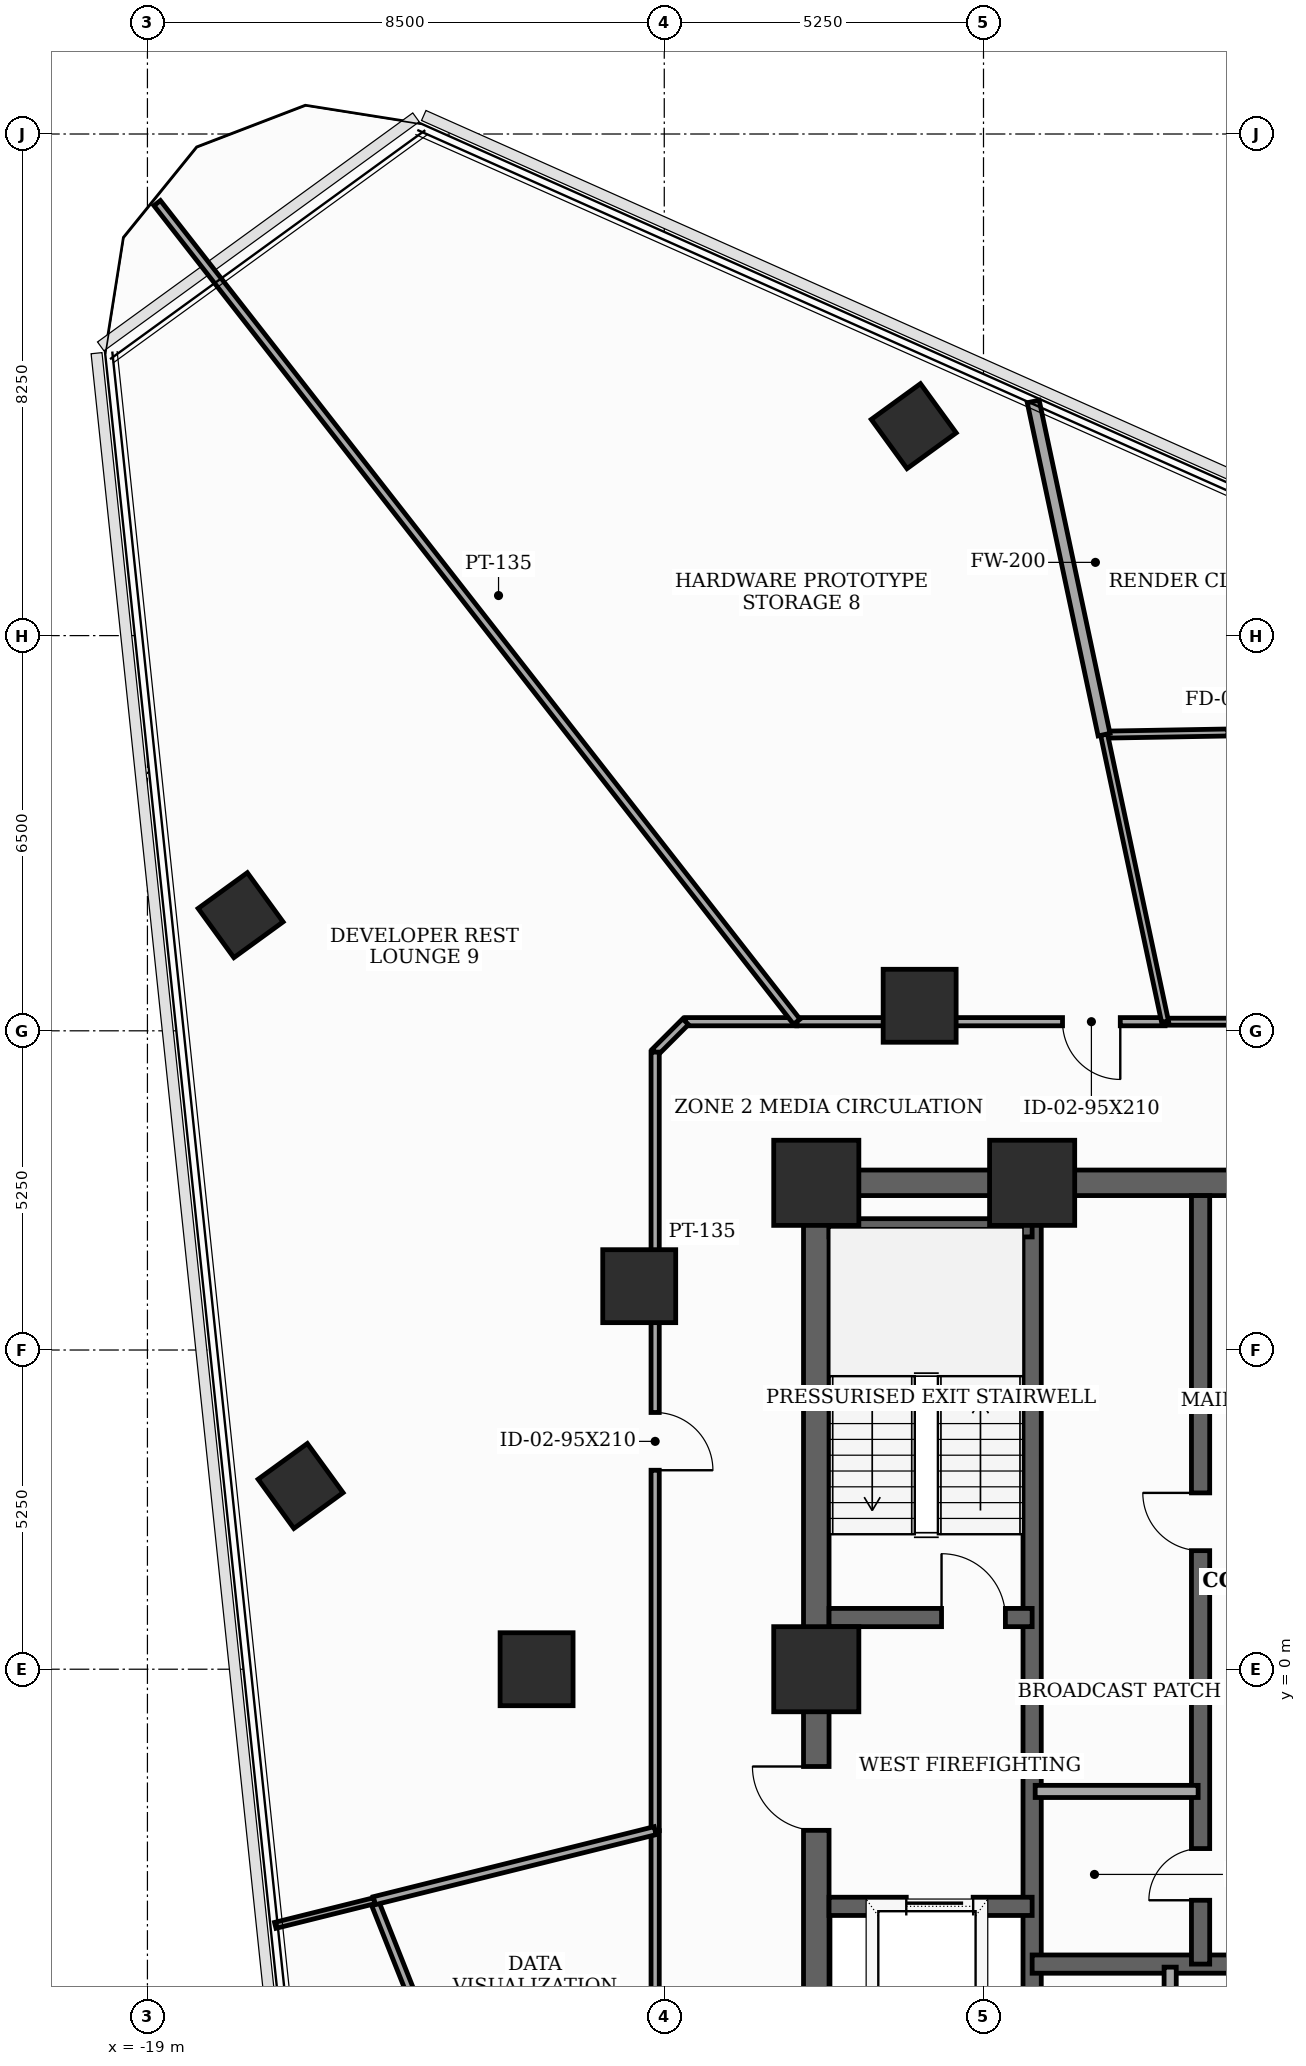
"""IFC4 building model, lengths in metres.
Left out: names, types, materials, properties, quantities, classifications, styles, units other than length and angle.
Written with IfcOpenShell. Run it as: python <this file> out.ifc"""

import sys

from ifc_helpers import new_model, si_unit, direction, frame, frame_2d, origin, origin_2d, place, context, subcontext, project, spatial, rectangle, extrude, element, fill, save


model = new_model("IFC4")
c1 = context("Model", 3, precision=1e-05, world=origin(), true_north=direction((0.0, 1.0)))
c2 = subcontext(c1, "Body", "Model", "MODEL_VIEW")
j1 = project(units=[si_unit("LENGTHUNIT", "METRE"), si_unit("PLANEANGLEUNIT", "RADIAN")], contexts=[c1])
p1 = place(None, origin())
s1 = spatial("IfcSite", under=j1, at=p1, CompositionType="ELEMENT")
p2 = place(p1, origin())
s2 = spatial("IfcBuilding", under=s1, at=p2, CompositionType="ELEMENT")
p3 = place(p2, frame((0.0, 0.0, 176.8)))
s3 = spatial("IfcBuildingStorey", under=s2, at=p3, CompositionType="ELEMENT", Elevation=176.8)
for number, where, z_axis, x_axis in (
    (1, (-4.45, 8.0, 0.0), (0.0, 0.0, 1.0), (1.0, 0.0, 0.0)),
    (2, (-8.0, 8.0, 0.0), (0.0, 0.0, 1.0), (1.0, 0.0, 0.0)),
    (3, (-8.0, 0.0, 0.0), (0.0, 0.0, 1.0), (1.0, 0.0, 0.0)),
):
    element("IfcColumn", number, at=place(p3, frame(where, z_axis=z_axis, x_axis=x_axis)), inside=s3, PredefinedType="COLUMN", context=c2, shape_type="SweptSolid", body=[
        extrude(rectangle(XDim=1.4, YDim=1.4, at=origin_2d()), origin(), (0.0, 0.0, 1.0), 3.7),
    ])
for number, where, z_axis, x_axis in (
    (4, (-6.3, 10.912, 0.0), (0.0, 0.0, 1.0), (1.0, 0.0, 0.0)),
    (5, (-10.912, 6.3, 0.0), (0.0, 0.0, 1.0), (1.0, 0.0, 0.0)),
    (6, (-12.6, 0.0, 0.0), (0.0, 0.0, 1.0), (1.0, 0.0, 0.0)),
):
    element("IfcColumn", number, at=place(p3, frame(where, z_axis=z_axis, x_axis=x_axis)), inside=s3, PredefinedType="COLUMN", context=c2, shape_type="SweptSolid", body=[
        extrude(rectangle(XDim=1.2, YDim=1.2, at=origin_2d()), origin(), (0.0, 0.0, 1.0), 3.7),
    ])
for number, where, z_axis, x_axis in (
    (7, (-6.397, 20.445, 0.0), (0.0, 0.0, 1.0), (0.809, 0.588, 0.0)),
    (8, (-17.468, 12.402, 0.0), (0.0, 0.0, 1.0), (0.809, 0.588, 0.0)),
    (9, (-16.481, 3.014, 0.0), (0.0, 0.0, 1.0), (0.809, 0.588, 0.0)),
):
    element("IfcColumn", number, at=place(p3, frame(where, z_axis=z_axis, x_axis=x_axis)), inside=s3, PredefinedType="COLUMN", context=c2, shape_type="SweptSolid", body=[
        extrude(rectangle(XDim=1.0, YDim=1.0, at=origin_2d()), origin(), (0.0, 0.0, 1.0), 3.7),
    ])
p4 = place(p3, frame((-8.0, -8.0, 0.0), z_axis=(0.0, 0.0, 1.0), x_axis=(0.0, 1.0, 0.0)))
e10 = element("IfcWall", 10, at=p4, inside=s3, PredefinedType="SHEAR", context=c2, shape_type="SweptSolid", body=[
    extrude(rectangle(XDim=16.0, YDim=0.42, at=frame_2d((8.0, 0.0))), origin(), (0.0, 0.0, 1.0), 3.5),
])
p5 = place(p4, frame((0.922, 0.0, 0.0)))
e11 = element("IfcOpeningElement", 11, at=p5, cuts=e10, PredefinedType="OPENING", context=c2, shape_type="SweptSolid", body=[
    extrude(rectangle(XDim=0.85, YDim=2.02, at=frame_2d((0.425, 1.01))), frame((0.0, 0.22, 0.0), z_axis=(0.0, -1.0, 0.0), x_axis=(1.0, 0.0, 0.0)), (0.0, 0.0, 1.0), 0.44),
])
p6 = place(p4, frame((5.35, 0.0, 0.0)))
e12 = element("IfcOpeningElement", 12, at=p6, cuts=e10, PredefinedType="OPENING", context=c2, shape_type="SweptSolid", body=[
    extrude(rectangle(XDim=1.05, YDim=2.15, at=frame_2d((0.525, 1.075))), frame((0.0, 0.22, 0.0), z_axis=(0.0, -1.0, 0.0), x_axis=(1.0, 0.0, 0.0)), (0.0, 0.0, 1.0), 0.44),
])
p7 = place(p3, frame((-8.0, 8.0, 0.0), z_axis=(0.0, 0.0, 1.0), x_axis=(1.0, 0.0, 0.0)))
e13 = element("IfcWall", 13, at=p7, inside=s3, PredefinedType="SHEAR", context=c2, shape_type="SweptSolid", body=[
    extrude(rectangle(XDim=16.0, YDim=0.42, at=frame_2d((8.0, 0.0))), origin(), (0.0, 0.0, 1.0), 3.5),
])
p8 = place(p7, frame((7.1, 0.0, 0.0)))
e14 = element("IfcOpeningElement", 14, at=p8, cuts=e13, PredefinedType="OPENING", context=c2, shape_type="SweptSolid", body=[
    extrude(rectangle(XDim=1.8, YDim=2.15, at=frame_2d((0.9, 1.075))), frame((0.0, 0.22, 0.0), z_axis=(0.0, -1.0, 0.0), x_axis=(1.0, 0.0, 0.0)), (0.0, 0.0, 1.0), 0.44),
])
p9 = place(p3, frame((-4.45, -7.79, 0.0), z_axis=(0.0, 0.0, 1.0), x_axis=(0.0, 1.0, 0.0)))
e15 = element("IfcWall", 15, at=p9, inside=s3, PredefinedType="SHEAR", context=c2, shape_type="SweptSolid", body=[
    extrude(rectangle(XDim=15.58, YDim=0.3, at=frame_2d((7.79, 0.0))), origin(), (0.0, 0.0, 1.0), 3.5),
])
p10 = place(p3, frame((-7.79, 0.85, 0.0), z_axis=(0.0, 0.0, 1.0), x_axis=(1.0, 0.0, 0.0)))
e16 = element("IfcWall", 16, at=p10, inside=s3, PredefinedType="SHEAR", context=c2, shape_type="SweptSolid", body=[
    extrude(rectangle(XDim=3.34, YDim=0.3, at=frame_2d((1.67, 0.0))), origin(), (0.0, 0.0, 1.0), 3.5),
])
p11 = place(p10, frame((1.85, 0.0, 0.0)))
e17 = element("IfcOpeningElement", 17, at=p11, cuts=e16, PredefinedType="OPENING", context=c2, shape_type="SweptSolid", body=[
    extrude(rectangle(XDim=1.05, YDim=2.15, at=frame_2d((0.525, 1.075))), frame((0.0, 0.16, 0.0), z_axis=(0.0, -1.0, 0.0), x_axis=(1.0, 0.0, 0.0)), (0.0, 0.0, 1.0), 0.32),
])
p12 = place(p3, frame((-7.79, 7.26, 0.0), z_axis=(0.0, 0.0, 1.0), x_axis=(1.0, 0.0, 0.0)))
e18 = element("IfcWall", 18, at=p12, inside=s3, PredefinedType="SHEAR", context=c2, shape_type="SweptSolid", body=[
    extrude(rectangle(XDim=3.34, YDim=0.3, at=frame_2d((1.67, 0.0))), origin(), (0.0, 0.0, 1.0), 3.5),
])
p13 = place(p3, frame((-7.79, -3.9, 0.0), z_axis=(0.0, 0.0, 1.0), x_axis=(1.0, 0.0, 0.0)))
e19 = element("IfcWall", 19, at=p13, inside=s3, PredefinedType="SHEAR", context=c2, shape_type="SweptSolid", body=[
    extrude(rectangle(XDim=3.34, YDim=0.3, at=frame_2d((1.67, 0.0))), origin(), (0.0, 0.0, 1.0), 3.5),
])
p14 = place(p13, frame((1.27, 0.0, 0.0)))
e20 = element("IfcOpeningElement", 20, at=p14, cuts=e19, PredefinedType="OPENING", context=c2, shape_type="SweptSolid", body=[
    extrude(rectangle(XDim=1.1, YDim=2.1, at=frame_2d((0.55, 1.05))), frame((0.0, 0.16, 0.0), z_axis=(0.0, -1.0, 0.0), x_axis=(1.0, 0.0, 0.0)), (0.0, 0.0, 1.0), 0.32),
])
p15 = place(p3, frame((-4.45, -4.85, 0.0), z_axis=(0.0, 0.0, 1.0), x_axis=(1.0, 0.0, 0.0)))
e21 = element("IfcWall", 21, at=p15, inside=s3, PredefinedType="SHEAR", context=c2, shape_type="SweptSolid", body=[
    extrude(rectangle(XDim=8.9, YDim=0.3, at=frame_2d((4.45, 0.0))), origin(), (0.0, 0.0, 1.0), 3.5),
])
p16 = place(p3, frame((-1.68, -4.85, 0.0), z_axis=(0.0, 0.0, 1.0), x_axis=(0.0, 1.0, 0.0)))
e22 = element("IfcWall", 22, at=p16, inside=s3, PredefinedType="SHEAR", context=c2, shape_type="SweptSolid", body=[
    extrude(rectangle(XDim=12.64, YDim=0.3, at=frame_2d((6.32, 0.0))), origin(), (0.0, 0.0, 1.0), 3.5),
])
p17 = place(p16, frame((1.05, 0.0, 0.0)))
e23 = element("IfcOpeningElement", 23, at=p17, cuts=e22, PredefinedType="OPENING", context=c2, shape_type="SweptSolid", body=[
    extrude(rectangle(XDim=0.85, YDim=2.02, at=frame_2d((0.425, 1.01))), frame((0.0, 0.16, 0.0), z_axis=(0.0, -1.0, 0.0), x_axis=(1.0, 0.0, 0.0)), (0.0, 0.0, 1.0), 0.32),
])
p18 = place(p16, frame((6.8, 0.0, 0.0)))
e24 = element("IfcOpeningElement", 24, at=p18, cuts=e22, PredefinedType="OPENING", context=c2, shape_type="SweptSolid", body=[
    extrude(rectangle(XDim=0.95, YDim=2.1, at=frame_2d((0.475, 1.05))), frame((0.0, 0.16, 0.0), z_axis=(0.0, -1.0, 0.0), x_axis=(1.0, 0.0, 0.0)), (0.0, 0.0, 1.0), 0.32),
])
p19 = place(p3, frame((-2.18, -7.85, 0.0), z_axis=(0.0, 0.0, 1.0), x_axis=(0.0, 1.0, 0.0)))
e25 = element("IfcWall", 25, at=p19, inside=s3, PredefinedType="SOLIDWALL", context=c2, shape_type="SweptSolid", body=[
    extrude(rectangle(XDim=2.95, YDim=0.2, at=frame_2d((1.475, 0.0))), origin(), (0.0, 0.0, 1.0), 2.885),
])
p20 = place(p3, frame((-4.4, -2.01, 0.0), z_axis=(0.0, 0.0, 1.0), x_axis=(1.0, 0.0, 0.0)))
e26 = element("IfcWall", 26, at=p20, inside=s3, PredefinedType="SOLIDWALL", context=c2, shape_type="SweptSolid", body=[
    extrude(rectangle(XDim=2.68, YDim=0.2, at=frame_2d((1.34, 0.0))), origin(), (0.0, 0.0, 1.0), 3.5),
])
p21 = place(p3, frame((-10.65, -2.655, 0.0), z_axis=(0.0, 0.0, 1.0), x_axis=(0.0, -1.0, 0.0)))
e27 = element("IfcWall", 27, at=p21, inside=s3, PredefinedType="PARTITIONING", context=c2, shape_type="SweptSolid", body=[
    extrude(rectangle(XDim=7.495, YDim=0.135, at=frame_2d((3.748, 0.0))), origin(), (0.0, 0.0, 1.0), 2.885),
])
p22 = place(p3, frame((10.15, 10.65, 0.0), z_axis=(0.0, 0.0, 1.0), x_axis=(-1.0, 0.0, 0.0)))
e28 = element("IfcWall", 28, at=p22, inside=s3, PredefinedType="PARTITIONING", context=c2, shape_type="SweptSolid", body=[
    extrude(rectangle(XDim=12.414, YDim=0.115, at=frame_2d((6.207, 0.0))), origin(), (0.0, 0.0, 1.0), 2.885),
])
p23 = place(p22, frame((7.222, 0.0, 0.0)))
e29 = element("IfcOpeningElement", 29, at=p23, cuts=e28, PredefinedType="OPENING", context=c2, shape_type="SweptSolid", body=[
    extrude(rectangle(XDim=0.95, YDim=2.1, at=frame_2d((0.475, 1.05))), frame((0.0, 0.067, 0.0), z_axis=(0.0, -1.0, 0.0), x_axis=(1.0, 0.0, 0.0)), (0.0, 0.0, 1.0), 0.135),
])
p24 = place(p3, frame((-2.264, 10.65, 0.0), z_axis=(0.0, 0.0, 1.0), x_axis=(-1.0, 0.0, 0.0)))
e30 = element("IfcWall", 30, at=p24, inside=s3, PredefinedType="PARTITIONING", context=c2, shape_type="SweptSolid", body=[
    extrude(rectangle(XDim=6.057, YDim=0.135, at=frame_2d((3.029, 0.0))), origin(), (0.0, 0.0, 1.0), 2.885),
])
p25 = place(p24, frame((0.736, 0.0, 0.0)))
e31 = element("IfcOpeningElement", 31, at=p25, cuts=e30, PredefinedType="OPENING", context=c2, shape_type="SweptSolid", body=[
    extrude(rectangle(XDim=0.95, YDim=2.1, at=frame_2d((0.475, 1.05))), frame((0.0, 0.077, 0.0), z_axis=(0.0, -1.0, 0.0), x_axis=(1.0, 0.0, 0.0)), (0.0, 0.0, 1.0), 0.155),
])
p26 = place(p3, frame((-8.321, 10.65, 0.0), z_axis=(0.0, 0.0, 1.0), x_axis=(-1.0, 0.0, 0.0)))
e32 = element("IfcWall", 32, at=p26, inside=s3, PredefinedType="PARTITIONING", context=c2, shape_type="SweptSolid", body=[
    extrude(rectangle(XDim=1.829, YDim=0.135, at=frame_2d((0.915, 0.0))), origin(), (0.0, 0.0, 1.0), 3.5),
])
p27 = place(p3, frame((-10.15, 10.65, 0.0), z_axis=(0.0, 0.0, 1.0), x_axis=(-0.707106781187, -0.707106781187, 0.0)))
e33 = element("IfcWall", 33, at=p27, inside=s3, PredefinedType="PARTITIONING", context=c2, shape_type="SweptSolid", body=[
    extrude(rectangle(XDim=0.707, YDim=0.135, at=frame_2d((0.354, 0.0))), origin(), (0.0, 0.0, 1.0), 3.5),
])
p28 = place(p3, frame((-10.65, 10.15, 0.0), z_axis=(0.0, 0.0, 1.0), x_axis=(0.0, -1.0, 0.0)))
e34 = element("IfcWall", 34, at=p28, inside=s3, PredefinedType="PARTITIONING", context=c2, shape_type="SweptSolid", body=[
    extrude(rectangle(XDim=12.805, YDim=0.135, at=frame_2d((6.402, 0.0))), origin(), (0.0, 0.0, 1.0), 2.885),
])
p29 = place(p28, frame((5.927, 0.0, 0.0)))
e35 = element("IfcOpeningElement", 35, at=p29, cuts=e34, PredefinedType="OPENING", context=c2, shape_type="SweptSolid", body=[
    extrude(rectangle(XDim=0.95, YDim=2.1, at=frame_2d((0.475, 1.05))), frame((0.0, 0.077, 0.0), z_axis=(0.0, -1.0, 0.0), x_axis=(1.0, 0.0, 0.0)), (0.0, 0.0, 1.0), 0.155),
])
p30 = place(p3, frame((-15.271, -3.808, 0.0), z_axis=(0.0, 0.0, 1.0), x_axis=(0.369182774414, -0.929356809345, 0.0)))
e36 = element("IfcWall", 36, at=p30, inside=s3, PredefinedType="PARTITIONING", context=c2, shape_type="SweptSolid", body=[
    extrude(rectangle(XDim=4.616, YDim=0.135, at=frame_2d((2.308, 0.0))), origin(), (0.0, 0.0, 1.0), 2.885),
])
p31 = place(p3, frame((-10.65, -2.655, 0.0), z_axis=(0.0, 0.0, 1.0), x_axis=(-0.970250953753, -0.242101397643, 0.0)))
e37 = element("IfcWall", 37, at=p31, inside=s3, PredefinedType="PARTITIONING", context=c2, shape_type="SweptSolid", body=[
    extrude(rectangle(XDim=4.763, YDim=0.135, at=frame_2d((2.381, 0.0))), origin(), (0.0, 0.0, 1.0), 2.885),
])
p32 = place(p3, frame((-15.271, -3.808, 0.0), z_axis=(0.0, 0.0, 1.0), x_axis=(-0.970407499575, -0.24147315538, 0.0)))
e38 = element("IfcWall", 38, at=p32, inside=s3, PredefinedType="MOVABLE", context=c2, shape_type="SweptSolid", body=[
    extrude(rectangle(XDim=1.676, YDim=0.1, at=frame_2d((0.838, 0.0))), origin(), (0.0, 0.0, 1.0), 2.985),
])
p33 = place(p3, frame((3.304, 15.486, 0.0), z_axis=(0.0, 0.0, 1.0), x_axis=(-0.999848226563, -0.017421935587, 0.0)))
e39 = element("IfcWall", 39, at=p33, inside=s3, PredefinedType="PARTITIONING", context=c2, shape_type="SweptSolid", body=[
    extrude(rectangle(XDim=6.572, YDim=0.115, at=frame_2d((3.286, 0.0))), origin(), (0.0, 0.0, 1.0), 2.885),
])
p34 = place(p33, frame((3.615, 0.0, 0.0)))
e40 = element("IfcOpeningElement", 40, at=p34, cuts=e39, PredefinedType="OPENING", context=c2, shape_type="SweptSolid", body=[
    extrude(rectangle(XDim=0.92, YDim=2.1, at=frame_2d((0.46, 1.05))), frame((0.0, 0.067, 0.0), z_axis=(0.0, -1.0, 0.0), x_axis=(1.0, 0.0, 0.0)), (0.0, 0.0, 1.0), 0.135),
])
p35 = place(p3, frame((-3.267, 15.371, 0.0), z_axis=(0.0, 0.0, 1.0), x_axis=(0.207843026781, -0.978162193207, 0.0)))
e41 = element("IfcWall", 41, at=p35, inside=s3, PredefinedType="PARTITIONING", context=c2, shape_type="SweptSolid", body=[
    extrude(rectangle(XDim=4.827, YDim=0.115, at=frame_2d((2.413, 0.0))), origin(), (0.0, 0.0, 1.0), 2.885),
])
p36 = place(p3, frame((-4.432, 20.851, 0.0), z_axis=(0.0, 0.0, 1.0), x_axis=(0.208002083798, -0.978128382747, 0.0)))
e42 = element("IfcWall", 42, at=p36, inside=s3, PredefinedType="SOLIDWALL", context=c2, shape_type="SweptSolid", body=[
    extrude(rectangle(XDim=5.602, YDim=0.2, at=frame_2d((2.801, 0.0))), origin(), (0.0, 0.0, 1.0), 2.985),
])
p37 = place(p3, frame((-18.84, 24.114, 0.0), z_axis=(0.0, 0.0, 1.0), x_axis=(0.615640714438, -0.78802697335, 0.0)))
e43 = element("IfcWall", 43, at=p37, inside=s3, PredefinedType="PARTITIONING", context=c2, shape_type="SweptSolid", body=[
    extrude(rectangle(XDim=17.085, YDim=0.135, at=frame_2d((8.543, 0.0))), origin(), (0.0, 0.0, 1.0), 2.985),
])
p38 = place(p6, origin())
e44 = element("IfcDoor", 44, at=p38, inside=s3, OperationType="SINGLE_SWING_RIGHT", PredefinedType="DOOR", context=c2, shape_type="SweptSolid", body=[
    extrude(rectangle(XDim=1.05, YDim=2.15, at=frame_2d((0.525, 1.075))), frame((0.0, 0.025, 0.0), z_axis=(0.0, -1.0, 0.0), x_axis=(1.0, 0.0, 0.0)), (0.0, 0.0, 1.0), 0.05),
])
fill(e12, e44)
p39 = place(p11, origin())
e45 = element("IfcDoor", 45, at=p39, inside=s3, OperationType="SINGLE_SWING_LEFT", PredefinedType="DOOR", context=c2, shape_type="SweptSolid", body=[
    extrude(rectangle(XDim=1.05, YDim=2.15, at=frame_2d((0.525, 1.075))), frame((0.0, 0.025, 0.0), z_axis=(0.0, -1.0, 0.0), x_axis=(1.0, 0.0, 0.0)), (0.0, 0.0, 1.0), 0.05),
])
fill(e17, e45)
p40 = place(p14, origin())
e46 = element("IfcDoor", 46, at=p40, inside=s3, OperationType="SLIDING_TO_LEFT", PredefinedType="DOOR", context=c2, shape_type="SweptSolid", body=[
    extrude(rectangle(XDim=1.1, YDim=2.1, at=frame_2d((0.55, 1.05))), frame((0.0, 0.025, 0.0), z_axis=(0.0, -1.0, 0.0), x_axis=(1.0, 0.0, 0.0)), (0.0, 0.0, 1.0), 0.05),
])
fill(e20, e46)
p41 = place(p17, origin())
e47 = element("IfcDoor", 47, at=p41, inside=s3, OperationType="SINGLE_SWING_LEFT", PredefinedType="TRAPDOOR", context=c2, shape_type="SweptSolid", body=[
    extrude(rectangle(XDim=0.85, YDim=2.02, at=frame_2d((0.425, 1.01))), frame((0.0, 0.025, 0.0), z_axis=(0.0, -1.0, 0.0), x_axis=(1.0, 0.0, 0.0)), (0.0, 0.0, 1.0), 0.05),
])
fill(e23, e47)
p42 = place(p18, origin())
e48 = element("IfcDoor", 48, at=p42, inside=s3, OperationType="SINGLE_SWING_RIGHT", PredefinedType="DOOR", context=c2, shape_type="SweptSolid", body=[
    extrude(rectangle(XDim=0.95, YDim=2.1, at=frame_2d((0.475, 1.05))), frame((0.0, 0.025, 0.0), z_axis=(0.0, -1.0, 0.0), x_axis=(1.0, 0.0, 0.0)), (0.0, 0.0, 1.0), 0.05),
])
fill(e24, e48)
p43 = place(p25, origin())
e49 = element("IfcDoor", 49, at=p43, inside=s3, OperationType="SINGLE_SWING_LEFT", PredefinedType="DOOR", context=c2, shape_type="SweptSolid", body=[
    extrude(rectangle(XDim=0.95, YDim=2.1, at=frame_2d((0.475, 1.05))), frame((0.0, 0.025, 0.0), z_axis=(0.0, -1.0, 0.0), x_axis=(1.0, 0.0, 0.0)), (0.0, 0.0, 1.0), 0.05),
])
fill(e31, e49)
p44 = place(p29, origin())
e50 = element("IfcDoor", 50, at=p44, inside=s3, OperationType="SINGLE_SWING_RIGHT", PredefinedType="DOOR", context=c2, shape_type="SweptSolid", body=[
    extrude(rectangle(XDim=0.95, YDim=2.1, at=frame_2d((0.475, 1.05))), frame((0.0, 0.025, 0.0), z_axis=(0.0, -1.0, 0.0), x_axis=(1.0, 0.0, 0.0)), (0.0, 0.0, 1.0), 0.05),
])
fill(e35, e50)
save(model, sys.argv[1])
